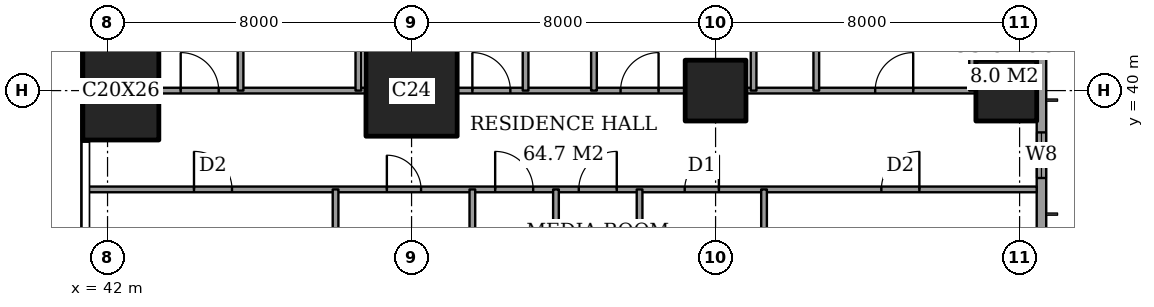
"""IFC4 building model, lengths in metres.
Left out: names, types, materials, properties, quantities, classifications, styles, units other than length and angle.
Written with IfcOpenShell. Run it as: python <this file> out.ifc"""

import sys

from ifc_helpers import new_model, si_unit, direction, frame, frame_2d, origin, origin_2d, place, context, subcontext, project, spatial, rectangle, extrude, element, fill, save


model = new_model("IFC4")
c1 = context("Model", 3, precision=1e-05, world=origin(), true_north=direction((0.0, 1.0)))
c2 = subcontext(c1, "Body", "Model", "MODEL_VIEW")
j1 = project(units=[si_unit("LENGTHUNIT", "METRE"), si_unit("PLANEANGLEUNIT", "RADIAN")], contexts=[c1])
p1 = place(None, origin())
s1 = spatial("IfcSite", under=j1, at=p1, CompositionType="ELEMENT")
p2 = place(p1, origin())
s2 = spatial("IfcBuilding", under=s1, at=p2, CompositionType="ELEMENT")
p3 = place(p2, frame((0.0, 0.0, 234.0)))
s3 = spatial("IfcBuildingStorey", under=s2, at=p3, CompositionType="ELEMENT", Elevation=234.0)
p4 = place(p3, frame((42.35, 40.0, 0.0), z_axis=(0.0, 0.0, 1.0), x_axis=(1.0, 0.0, 0.0)))
e1 = element("IfcColumn", 1, at=p4, inside=s3, PredefinedType="COLUMN", context=c2, shape_type="SweptSolid", body=[
    extrude(rectangle(XDim=2.0, YDim=2.6, at=origin_2d()), origin(), (0.0, 0.0, 1.0), 3.6),
])
p5 = place(p3, frame((50.0, 40.0, 0.0), z_axis=(0.0, 0.0, 1.0), x_axis=(1.0, 0.0, 0.0)))
e2 = element("IfcColumn", 2, at=p5, inside=s3, PredefinedType="COLUMN", context=c2, shape_type="SweptSolid", body=[
    extrude(rectangle(XDim=2.4, YDim=2.4, at=origin_2d()), origin(), (0.0, 0.0, 1.0), 3.6),
])
for number, where, z_axis, x_axis in (
    (3, (58.0, 40.0, 0.0), (0.0, 0.0, 1.0), (1.0, 0.0, 0.0)),
    (4, (65.65, 40.0, 0.0), (0.0, 0.0, 1.0), (1.0, 0.0, 0.0)),
):
    element("IfcColumn", number, at=place(p3, frame(where, z_axis=z_axis, x_axis=x_axis)), inside=s3, PredefinedType="COLUMN", context=c2, shape_type="SweptSolid", body=[
        extrude(rectangle(XDim=1.6, YDim=1.6, at=origin_2d()), origin(), (0.0, 0.0, 1.0), 3.6),
    ])
p6 = place(p3, frame((66.575, 3.175, 0.0), z_axis=(0.0, 0.0, 1.0), x_axis=(0.0, 1.0, 0.0)))
e5 = element("IfcWall", 5, at=p6, inside=s3, PredefinedType="SOLIDWALL", context=c2, shape_type="SweptSolid", body=[
    extrude(rectangle(XDim=41.65, YDim=0.25, at=frame_2d((20.825, 0.0))), origin(), (0.0, 0.0, 1.0), 3.6),
])
p7 = place(p6, frame((0.875, 0.0, 0.6)))
e6 = element("IfcOpeningElement", 6, at=p7, cuts=e5, PredefinedType="OPENING", context=c2, shape_type="SweptSolid", body=[
    extrude(rectangle(XDim=2.4, YDim=2.0, at=frame_2d((1.2, 1.0))), frame((0.0, 0.135, 0.0), z_axis=(0.0, -1.0, 0.0), x_axis=(1.0, 0.0, 0.0)), (0.0, 0.0, 1.0), 0.27),
])
p8 = place(p6, frame((6.225, 0.0, 0.6)))
e7 = element("IfcOpeningElement", 7, at=p8, cuts=e5, PredefinedType="OPENING", context=c2, shape_type="SweptSolid", body=[
    extrude(rectangle(XDim=1.2, YDim=2.0, at=frame_2d((0.6, 1.0))), frame((0.0, 0.135, 0.0), z_axis=(0.0, -1.0, 0.0), x_axis=(1.0, 0.0, 0.0)), (0.0, 0.0, 1.0), 0.27),
])
p9 = place(p6, frame((8.725, 0.0, 0.6)))
e8 = element("IfcOpeningElement", 8, at=p9, cuts=e5, PredefinedType="OPENING", context=c2, shape_type="SweptSolid", body=[
    extrude(rectangle(XDim=2.4, YDim=2.0, at=frame_2d((1.2, 1.0))), frame((0.0, 0.135, 0.0), z_axis=(0.0, -1.0, 0.0), x_axis=(1.0, 0.0, 0.0)), (0.0, 0.0, 1.0), 0.27),
])
p10 = place(p6, frame((15.725, 0.0, 0.6)))
e9 = element("IfcOpeningElement", 9, at=p10, cuts=e5, PredefinedType="OPENING", context=c2, shape_type="SweptSolid", body=[
    extrude(rectangle(XDim=2.4, YDim=2.0, at=frame_2d((1.2, 1.0))), frame((0.0, 0.135, 0.0), z_axis=(0.0, -1.0, 0.0), x_axis=(1.0, 0.0, 0.0)), (0.0, 0.0, 1.0), 0.27),
])
p11 = place(p6, frame((23.525, 0.0, 0.6)))
e10 = element("IfcOpeningElement", 10, at=p11, cuts=e5, PredefinedType="OPENING", context=c2, shape_type="SweptSolid", body=[
    extrude(rectangle(XDim=2.4, YDim=2.0, at=frame_2d((1.2, 1.0))), frame((0.0, 0.135, 0.0), z_axis=(0.0, -1.0, 0.0), x_axis=(1.0, 0.0, 0.0)), (0.0, 0.0, 1.0), 0.27),
])
p12 = place(p6, frame((30.725, 0.0, 0.6)))
e11 = element("IfcOpeningElement", 11, at=p12, cuts=e5, PredefinedType="OPENING", context=c2, shape_type="SweptSolid", body=[
    extrude(rectangle(XDim=2.4, YDim=2.0, at=frame_2d((1.2, 1.0))), frame((0.0, 0.135, 0.0), z_axis=(0.0, -1.0, 0.0), x_axis=(1.0, 0.0, 0.0)), (0.0, 0.0, 1.0), 0.27),
])
p13 = place(p6, frame((34.525, 0.0, 0.6)))
e12 = element("IfcOpeningElement", 12, at=p13, cuts=e5, PredefinedType="OPENING", context=c2, shape_type="SweptSolid", body=[
    extrude(rectangle(XDim=1.2, YDim=2.0, at=frame_2d((0.6, 1.0))), frame((0.0, 0.135, 0.0), z_axis=(0.0, -1.0, 0.0), x_axis=(1.0, 0.0, 0.0)), (0.0, 0.0, 1.0), 0.27),
])
p14 = place(p6, frame((38.375, 0.0, 0.6)))
e13 = element("IfcOpeningElement", 13, at=p14, cuts=e5, PredefinedType="OPENING", context=c2, shape_type="SweptSolid", body=[
    extrude(rectangle(XDim=2.4, YDim=2.0, at=frame_2d((1.2, 1.0))), frame((0.0, 0.135, 0.0), z_axis=(0.0, -1.0, 0.0), x_axis=(1.0, 0.0, 0.0)), (0.0, 0.0, 1.0), 0.27),
])
p15 = place(p3, frame((41.439, 37.4, 0.0), z_axis=(0.0, 0.0, 1.0), x_axis=(1.0, 0.0, 0.0)))
e14 = element("IfcWall", 14, at=p15, inside=s3, PredefinedType="PARTITIONING", context=c2, shape_type="SweptSolid", body=[
    extrude(rectangle(XDim=25.011, YDim=0.15, at=frame_2d((12.505, 0.0))), origin(), (0.0, 0.0, 1.0), 3.35),
])
p16 = place(p15, frame((10.761, 0.0, 0.0)))
e15 = element("IfcOpeningElement", 15, at=p16, cuts=e14, PredefinedType="OPENING", context=c2, shape_type="SweptSolid", body=[
    extrude(rectangle(XDim=1.0, YDim=2.1, at=frame_2d((0.5, 1.05))), frame((0.0, 0.085, 0.0), z_axis=(0.0, -1.0, 0.0), x_axis=(1.0, 0.0, 0.0)), (0.0, 0.0, 1.0), 0.17),
])
p17 = place(p15, frame((20.924, 0.0, 0.0)))
e16 = element("IfcOpeningElement", 16, at=p17, cuts=e14, PredefinedType="OPENING", context=c2, shape_type="SweptSolid", body=[
    extrude(rectangle(XDim=1.0, YDim=2.1, at=frame_2d((0.5, 1.05))), frame((0.0, 0.085, 0.0), z_axis=(0.0, -1.0, 0.0), x_axis=(1.0, 0.0, 0.0)), (0.0, 0.0, 1.0), 0.17),
])
p18 = place(p15, frame((15.749, 0.0, 0.0)))
e17 = element("IfcOpeningElement", 17, at=p18, cuts=e14, PredefinedType="OPENING", context=c2, shape_type="SweptSolid", body=[
    extrude(rectangle(XDim=0.9, YDim=2.1, at=frame_2d((0.45, 1.05))), frame((0.0, 0.085, 0.0), z_axis=(0.0, -1.0, 0.0), x_axis=(1.0, 0.0, 0.0)), (0.0, 0.0, 1.0), 0.17),
])
p19 = place(p15, frame((12.961, 0.0, 0.0)))
e18 = element("IfcOpeningElement", 18, at=p19, cuts=e14, PredefinedType="OPENING", context=c2, shape_type="SweptSolid", body=[
    extrude(rectangle(XDim=1.0, YDim=2.1, at=frame_2d((0.5, 1.05))), frame((0.0, 0.085, 0.0), z_axis=(0.0, -1.0, 0.0), x_axis=(1.0, 0.0, 0.0)), (0.0, 0.0, 1.0), 0.17),
])
p20 = place(p15, frame((7.911, 0.0, 0.0)))
e19 = element("IfcOpeningElement", 19, at=p20, cuts=e14, PredefinedType="OPENING", context=c2, shape_type="SweptSolid", body=[
    extrude(rectangle(XDim=0.9, YDim=2.1, at=frame_2d((0.45, 1.05))), frame((0.0, 0.085, 0.0), z_axis=(0.0, -1.0, 0.0), x_axis=(1.0, 0.0, 0.0)), (0.0, 0.0, 1.0), 0.17),
])
p21 = place(p15, frame((2.836, 0.0, 0.0)))
e20 = element("IfcOpeningElement", 20, at=p21, cuts=e14, PredefinedType="OPENING", context=c2, shape_type="SweptSolid", body=[
    extrude(rectangle(XDim=1.0, YDim=2.1, at=frame_2d((0.5, 1.05))), frame((0.0, 0.085, 0.0), z_axis=(0.0, -1.0, 0.0), x_axis=(1.0, 0.0, 0.0)), (0.0, 0.0, 1.0), 0.17),
])
p22 = place(p3, frame((43.35, 40.0, 0.0), z_axis=(0.0, 0.0, 1.0), x_axis=(1.0, 0.0, 0.0)))
e21 = element("IfcWall", 21, at=p22, inside=s3, PredefinedType="PARTITIONING", context=c2, shape_type="SweptSolid", body=[
    extrude(rectangle(XDim=5.45, YDim=0.15, at=frame_2d((2.725, 0.0))), origin(), (0.0, 0.0, 1.0), 3.35),
])
p23 = place(p22, frame((0.575, 0.0, 0.0)))
e22 = element("IfcOpeningElement", 22, at=p23, cuts=e21, PredefinedType="OPENING", context=c2, shape_type="SweptSolid", body=[
    extrude(rectangle(XDim=1.0, YDim=2.1, at=frame_2d((0.5, 1.05))), frame((0.0, 0.085, 0.0), z_axis=(0.0, -1.0, 0.0), x_axis=(1.0, 0.0, 0.0)), (0.0, 0.0, 1.0), 0.17),
])
p24 = place(p3, frame((51.2, 40.0, 0.0), z_axis=(0.0, 0.0, 1.0), x_axis=(1.0, 0.0, 0.0)))
e23 = element("IfcWall", 23, at=p24, inside=s3, PredefinedType="PARTITIONING", context=c2, shape_type="SweptSolid", body=[
    extrude(rectangle(XDim=6.0, YDim=0.15, at=frame_2d((3.0, 0.0))), origin(), (0.0, 0.0, 1.0), 3.35),
])
p25 = place(p24, frame((4.3, 0.0, 0.0)))
e24 = element("IfcOpeningElement", 24, at=p25, cuts=e23, PredefinedType="OPENING", context=c2, shape_type="SweptSolid", body=[
    extrude(rectangle(XDim=1.0, YDim=2.1, at=frame_2d((0.5, 1.05))), frame((0.0, 0.085, 0.0), z_axis=(0.0, -1.0, 0.0), x_axis=(1.0, 0.0, 0.0)), (0.0, 0.0, 1.0), 0.17),
])
p26 = place(p24, frame((0.4, 0.0, 0.0)))
e25 = element("IfcOpeningElement", 25, at=p26, cuts=e23, PredefinedType="OPENING", context=c2, shape_type="SweptSolid", body=[
    extrude(rectangle(XDim=1.0, YDim=2.1, at=frame_2d((0.5, 1.05))), frame((0.0, 0.085, 0.0), z_axis=(0.0, -1.0, 0.0), x_axis=(1.0, 0.0, 0.0)), (0.0, 0.0, 1.0), 0.17),
])
p27 = place(p3, frame((58.8, 40.0, 0.0), z_axis=(0.0, 0.0, 1.0), x_axis=(1.0, 0.0, 0.0)))
e26 = element("IfcWall", 26, at=p27, inside=s3, PredefinedType="PARTITIONING", context=c2, shape_type="SweptSolid", body=[
    extrude(rectangle(XDim=6.05, YDim=0.15, at=frame_2d((3.025, 0.0))), origin(), (0.0, 0.0, 1.0), 3.35),
])
p28 = place(p27, frame((3.4, 0.0, 0.0)))
e27 = element("IfcOpeningElement", 27, at=p28, cuts=e26, PredefinedType="OPENING", context=c2, shape_type="SweptSolid", body=[
    extrude(rectangle(XDim=1.0, YDim=2.1, at=frame_2d((0.5, 1.05))), frame((0.0, 0.085, 0.0), z_axis=(0.0, -1.0, 0.0), x_axis=(1.0, 0.0, 0.0)), (0.0, 0.0, 1.0), 0.17),
])
p29 = place(p3, frame((45.5, 40.0, 0.0), z_axis=(0.0, 0.0, 1.0), x_axis=(0.0, 1.0, 0.0)))
e28 = element("IfcWall", 28, at=p29, inside=s3, PredefinedType="PARTITIONING", context=c2, shape_type="SweptSolid", body=[
    extrude(rectangle(XDim=8.45, YDim=0.15, at=frame_2d((4.225, 0.0))), origin(), (0.0, 0.0, 1.0), 3.35),
])
p30 = place(p3, frame((48.0, 28.0, 0.0), z_axis=(0.0, 0.0, 1.0), x_axis=(0.0, 1.0, 0.0)))
e29 = element("IfcWall", 29, at=p30, inside=s3, PredefinedType="PARTITIONING", context=c2, shape_type="SweptSolid", body=[
    extrude(rectangle(XDim=9.4, YDim=0.15, at=frame_2d((4.7, 0.0))), origin(), (0.0, 0.0, 1.0), 3.35),
])
p31 = place(p30, frame((0.5, 0.0, 0.0)))
e30 = element("IfcOpeningElement", 30, at=p31, cuts=e29, PredefinedType="OPENING", context=c2, shape_type="SweptSolid", body=[
    extrude(rectangle(XDim=1.0, YDim=2.1, at=frame_2d((0.5, 1.05))), frame((0.0, 0.085, 0.0), z_axis=(0.0, -1.0, 0.0), x_axis=(1.0, 0.0, 0.0)), (0.0, 0.0, 1.0), 0.17),
])
p32 = place(p3, frame((48.6, 40.0, 0.0), z_axis=(0.0, 0.0, 1.0), x_axis=(0.0, 1.0, 0.0)))
e31 = element("IfcWall", 31, at=p32, inside=s3, PredefinedType="PARTITIONING", context=c2, shape_type="SweptSolid", body=[
    extrude(rectangle(XDim=8.45, YDim=0.15, at=frame_2d((4.225, 0.0))), origin(), (0.0, 0.0, 1.0), 3.35),
])
p33 = place(p32, frame((3.775, 0.0, 0.0)))
e32 = element("IfcOpeningElement", 32, at=p33, cuts=e31, PredefinedType="OPENING", context=c2, shape_type="SweptSolid", body=[
    extrude(rectangle(XDim=0.9, YDim=2.1, at=frame_2d((0.45, 1.05))), frame((0.0, 0.085, 0.0), z_axis=(0.0, -1.0, 0.0), x_axis=(1.0, 0.0, 0.0)), (0.0, 0.0, 1.0), 0.17),
])
p34 = place(p3, frame((51.6, 30.0, 0.0), z_axis=(0.0, 0.0, 1.0), x_axis=(0.0, 1.0, 0.0)))
e33 = element("IfcWall", 33, at=p34, inside=s3, PredefinedType="PARTITIONING", context=c2, shape_type="SweptSolid", body=[
    extrude(rectangle(XDim=7.4, YDim=0.15, at=frame_2d((3.7, 0.0))), origin(), (0.0, 0.0, 1.0), 3.35),
])
p35 = place(p3, frame((53.0, 40.0, 0.0), z_axis=(0.0, 0.0, 1.0), x_axis=(0.0, 1.0, 0.0)))
e34 = element("IfcWall", 34, at=p35, inside=s3, PredefinedType="PARTITIONING", context=c2, shape_type="SweptSolid", body=[
    extrude(rectangle(XDim=8.45, YDim=0.15, at=frame_2d((4.225, 0.0))), origin(), (0.0, 0.0, 1.0), 3.35),
])
p36 = place(p3, frame((53.8, 30.0, 0.0), z_axis=(0.0, 0.0, 1.0), x_axis=(0.0, 1.0, 0.0)))
e35 = element("IfcWall", 35, at=p36, inside=s3, PredefinedType="PARTITIONING", context=c2, shape_type="SweptSolid", body=[
    extrude(rectangle(XDim=7.4, YDim=0.15, at=frame_2d((3.7, 0.0))), origin(), (0.0, 0.0, 1.0), 3.35),
])
p37 = place(p3, frame((54.8, 40.0, 0.0), z_axis=(0.0, 0.0, 1.0), x_axis=(0.0, 1.0, 0.0)))
e36 = element("IfcWall", 36, at=p37, inside=s3, PredefinedType="PARTITIONING", context=c2, shape_type="SweptSolid", body=[
    extrude(rectangle(XDim=8.45, YDim=0.15, at=frame_2d((4.225, 0.0))), origin(), (0.0, 0.0, 1.0), 3.35),
])
p38 = place(p37, frame((3.775, 0.0, 0.0)))
e37 = element("IfcOpeningElement", 37, at=p38, cuts=e36, PredefinedType="OPENING", context=c2, shape_type="SweptSolid", body=[
    extrude(rectangle(XDim=0.9, YDim=2.1, at=frame_2d((0.45, 1.05))), frame((0.0, 0.085, 0.0), z_axis=(0.0, -1.0, 0.0), x_axis=(1.0, 0.0, 0.0)), (0.0, 0.0, 1.0), 0.17),
])
p39 = place(p3, frame((56.0, 28.0, 0.0), z_axis=(0.0, 0.0, 1.0), x_axis=(0.0, 1.0, 0.0)))
e38 = element("IfcWall", 38, at=p39, inside=s3, PredefinedType="PARTITIONING", context=c2, shape_type="SweptSolid", body=[
    extrude(rectangle(XDim=9.4, YDim=0.15, at=frame_2d((4.7, 0.0))), origin(), (0.0, 0.0, 1.0), 3.35),
])
p40 = place(p39, frame((0.5, 0.0, 0.0)))
e39 = element("IfcOpeningElement", 39, at=p40, cuts=e38, PredefinedType="OPENING", context=c2, shape_type="SweptSolid", body=[
    extrude(rectangle(XDim=1.0, YDim=2.1, at=frame_2d((0.5, 1.05))), frame((0.0, 0.085, 0.0), z_axis=(0.0, -1.0, 0.0), x_axis=(1.0, 0.0, 0.0)), (0.0, 0.0, 1.0), 0.17),
])
p41 = place(p3, frame((59.0, 40.0, 0.0), z_axis=(0.0, 0.0, 1.0), x_axis=(0.0, 1.0, 0.0)))
e40 = element("IfcWall", 40, at=p41, inside=s3, PredefinedType="PARTITIONING", context=c2, shape_type="SweptSolid", body=[
    extrude(rectangle(XDim=8.45, YDim=0.15, at=frame_2d((4.225, 0.0))), origin(), (0.0, 0.0, 1.0), 3.35),
])
p42 = place(p3, frame((59.275, 33.2, 0.0), z_axis=(0.0, 0.0, 1.0), x_axis=(0.0, 1.0, 0.0)))
e41 = element("IfcWall", 41, at=p42, inside=s3, PredefinedType="PARTITIONING", context=c2, shape_type="SweptSolid", body=[
    extrude(rectangle(XDim=4.2, YDim=0.15, at=frame_2d((2.1, 0.0))), origin(), (0.0, 0.0, 1.0), 3.35),
])
p43 = place(p3, frame((60.65, 40.0, 0.0), z_axis=(0.0, 0.0, 1.0), x_axis=(0.0, 1.0, 0.0)))
e42 = element("IfcWall", 42, at=p43, inside=s3, PredefinedType="PARTITIONING", context=c2, shape_type="SweptSolid", body=[
    extrude(rectangle(XDim=8.45, YDim=0.15, at=frame_2d((4.225, 0.0))), origin(), (0.0, 0.0, 1.0), 3.35),
])
p44 = place(p43, frame((3.775, 0.0, 0.0)))
e43 = element("IfcOpeningElement", 43, at=p44, cuts=e42, PredefinedType="OPENING", context=c2, shape_type="SweptSolid", body=[
    extrude(rectangle(XDim=0.9, YDim=2.1, at=frame_2d((0.45, 1.05))), frame((0.0, 0.085, 0.0), z_axis=(0.0, -1.0, 0.0), x_axis=(1.0, 0.0, 0.0)), (0.0, 0.0, 1.0), 0.17),
])
p45 = place(p3, frame((64.75, 40.0, 0.0), z_axis=(0.0, 0.0, 1.0), x_axis=(0.0, 1.0, 0.0)))
e44 = element("IfcWall", 44, at=p45, inside=s3, PredefinedType="PARTITIONING", context=c2, shape_type="SweptSolid", body=[
    extrude(rectangle(XDim=4.7, YDim=0.15, at=frame_2d((2.35, 0.0))), origin(), (0.0, 0.0, 1.0), 3.35),
])
p46 = place(p45, frame((1.9, 0.0, 0.0)))
e45 = element("IfcOpeningElement", 45, at=p46, cuts=e44, PredefinedType="OPENING", context=c2, shape_type="SweptSolid", body=[
    extrude(rectangle(XDim=0.9, YDim=2.1, at=frame_2d((0.45, 1.05))), frame((0.0, 0.085, 0.0), z_axis=(0.0, -1.0, 0.0), x_axis=(1.0, 0.0, 0.0)), (0.0, 0.0, 1.0), 0.17),
])
p47 = place(p13, origin())
e46 = element("IfcWindow", 46, at=p47, inside=s3, PartitioningType="SINGLE_PANEL", PredefinedType="WINDOW", context=c2, shape_type="SweptSolid", body=[
    extrude(rectangle(XDim=1.2, YDim=2.0, at=frame_2d((0.6, 1.0))), frame((0.0, 0.03, 0.0), z_axis=(0.0, -1.0, 0.0), x_axis=(1.0, 0.0, 0.0)), (0.0, 0.0, 1.0), 0.06),
])
fill(e12, e46)
p48 = place(p28, origin())
e47 = element("IfcDoor", 47, at=p48, inside=s3, OperationType="SINGLE_SWING_LEFT", PredefinedType="DOOR", context=c2, shape_type="SweptSolid", body=[
    extrude(rectangle(XDim=1.0, YDim=2.1, at=frame_2d((0.5, 1.05))), frame((0.0, 0.025, 0.0), z_axis=(0.0, -1.0, 0.0), x_axis=(1.0, 0.0, 0.0)), (0.0, 0.0, 1.0), 0.05),
])
fill(e27, e47)
p49 = place(p25, origin())
e48 = element("IfcDoor", 48, at=p49, inside=s3, OperationType="SINGLE_SWING_LEFT", PredefinedType="DOOR", context=c2, shape_type="SweptSolid", body=[
    extrude(rectangle(XDim=1.0, YDim=2.1, at=frame_2d((0.5, 1.05))), frame((0.0, 0.025, 0.0), z_axis=(0.0, -1.0, 0.0), x_axis=(1.0, 0.0, 0.0)), (0.0, 0.0, 1.0), 0.05),
])
fill(e24, e48)
p50 = place(p26, origin())
e49 = element("IfcDoor", 49, at=p50, inside=s3, OperationType="SINGLE_SWING_RIGHT", PredefinedType="DOOR", context=c2, shape_type="SweptSolid", body=[
    extrude(rectangle(XDim=1.0, YDim=2.1, at=frame_2d((0.5, 1.05))), frame((0.0, 0.025, 0.0), z_axis=(0.0, -1.0, 0.0), x_axis=(1.0, 0.0, 0.0)), (0.0, 0.0, 1.0), 0.05),
])
fill(e25, e49)
p51 = place(p23, origin())
e50 = element("IfcDoor", 50, at=p51, inside=s3, OperationType="SINGLE_SWING_RIGHT", PredefinedType="DOOR", context=c2, shape_type="SweptSolid", body=[
    extrude(rectangle(XDim=1.0, YDim=2.1, at=frame_2d((0.5, 1.05))), frame((0.0, 0.025, 0.0), z_axis=(0.0, -1.0, 0.0), x_axis=(1.0, 0.0, 0.0)), (0.0, 0.0, 1.0), 0.05),
])
fill(e22, e50)
p52 = place(p16, origin())
e51 = element("IfcDoor", 51, at=p52, inside=s3, OperationType="SINGLE_SWING_RIGHT", PredefinedType="DOOR", context=c2, shape_type="SweptSolid", body=[
    extrude(rectangle(XDim=1.0, YDim=2.1, at=frame_2d((0.5, 1.05))), frame((0.0, 0.025, 0.0), z_axis=(0.0, -1.0, 0.0), x_axis=(1.0, 0.0, 0.0)), (0.0, 0.0, 1.0), 0.05),
])
fill(e15, e51)
p53 = place(p17, origin())
e52 = element("IfcDoor", 52, at=p53, inside=s3, OperationType="SINGLE_SWING_LEFT", PredefinedType="DOOR", context=c2, shape_type="SweptSolid", body=[
    extrude(rectangle(XDim=1.0, YDim=2.1, at=frame_2d((0.5, 1.05))), frame((0.0, 0.025, 0.0), z_axis=(0.0, -1.0, 0.0), x_axis=(1.0, 0.0, 0.0)), (0.0, 0.0, 1.0), 0.05),
])
fill(e16, e52)
p54 = place(p18, origin())
e53 = element("IfcDoor", 53, at=p54, inside=s3, OperationType="SINGLE_SWING_LEFT", PredefinedType="DOOR", context=c2, shape_type="SweptSolid", body=[
    extrude(rectangle(XDim=0.9, YDim=2.1, at=frame_2d((0.45, 1.05))), frame((0.0, 0.025, 0.0), z_axis=(0.0, -1.0, 0.0), x_axis=(1.0, 0.0, 0.0)), (0.0, 0.0, 1.0), 0.05),
])
fill(e17, e53)
p55 = place(p19, origin())
e54 = element("IfcDoor", 54, at=p55, inside=s3, OperationType="SINGLE_SWING_LEFT", PredefinedType="DOOR", context=c2, shape_type="SweptSolid", body=[
    extrude(rectangle(XDim=1.0, YDim=2.1, at=frame_2d((0.5, 1.05))), frame((0.0, 0.025, 0.0), z_axis=(0.0, -1.0, 0.0), x_axis=(1.0, 0.0, 0.0)), (0.0, 0.0, 1.0), 0.05),
])
fill(e18, e54)
p56 = place(p20, origin())
e55 = element("IfcDoor", 55, at=p56, inside=s3, OperationType="SINGLE_SWING_RIGHT", PredefinedType="DOOR", context=c2, shape_type="SweptSolid", body=[
    extrude(rectangle(XDim=0.9, YDim=2.1, at=frame_2d((0.45, 1.05))), frame((0.0, 0.025, 0.0), z_axis=(0.0, -1.0, 0.0), x_axis=(1.0, 0.0, 0.0)), (0.0, 0.0, 1.0), 0.05),
])
fill(e19, e55)
p57 = place(p21, origin())
e56 = element("IfcDoor", 56, at=p57, inside=s3, OperationType="SINGLE_SWING_RIGHT", PredefinedType="DOOR", context=c2, shape_type="SweptSolid", body=[
    extrude(rectangle(XDim=1.0, YDim=2.1, at=frame_2d((0.5, 1.05))), frame((0.0, 0.025, 0.0), z_axis=(0.0, -1.0, 0.0), x_axis=(1.0, 0.0, 0.0)), (0.0, 0.0, 1.0), 0.05),
])
fill(e20, e56)
save(model, sys.argv[1])
